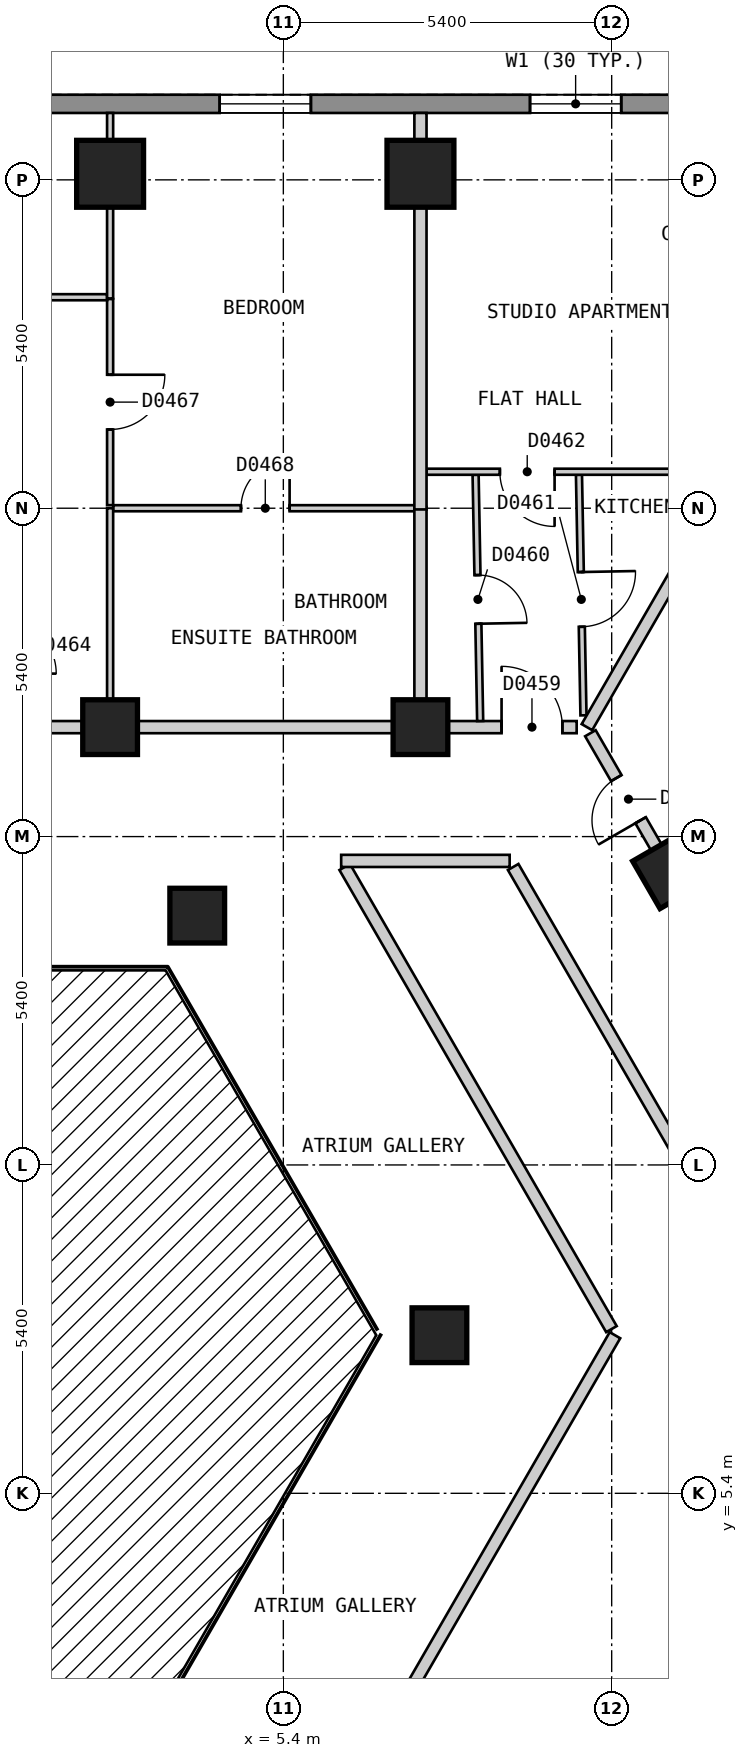
"""IFC4 building model, lengths in metres.
Left out: names, types, materials, properties, quantities, classifications, styles, units other than length and angle.
Written with IfcOpenShell. Run it as: python <this file> out.ifc"""

import sys

from ifc_helpers import new_model, si_unit, direction, frame, frame_2d, origin, origin_2d, place, context, subcontext, project, spatial, polyline, rectangle, outline, extrude, element, fill, save


model = new_model("IFC4")
c1 = context("Model", 3, precision=1e-05, world=origin(), true_north=direction((0.0, 1.0)))
c2 = subcontext(c1, "Body", "Model", "MODEL_VIEW")
j1 = project(units=[si_unit("LENGTHUNIT", "METRE"), si_unit("PLANEANGLEUNIT", "RADIAN")], contexts=[c1])
p1 = place(None, origin())
s1 = spatial("IfcSite", under=j1, at=p1, CompositionType="ELEMENT")
p2 = place(p1, origin())
s2 = spatial("IfcBuilding", under=s1, at=p2, CompositionType="ELEMENT")
p3 = place(p2, frame((0.0, 0.0, 38.4)))
s3 = spatial("IfcBuildingStorey", under=s2, at=p3, CompositionType="ELEMENT", Elevation=38.4)
for number, where, z_axis, x_axis in (
    (1, (7.655, 27.1, 0.0), (0.0, 0.0, 1.0), (-1.0, 0.0, 0.0)),
    (2, (2.551, 27.1, 0.0), (0.0, 0.0, 1.0), (-1.0, 0.0, 0.0)),
):
    element("IfcColumn", number, at=place(p3, frame(where, z_axis=z_axis, x_axis=x_axis)), inside=s3, PredefinedType="COLUMN", context=c2, shape_type="SweptSolid", body=[
        extrude(rectangle(XDim=1.1, YDim=1.1, at=origin_2d()), origin(), (0.0, 0.0, 1.0), 3.0),
    ])
for number, where, z_axis, x_axis in (
    (3, (7.967, 8.0, 0.0), (0.0, 0.0, 1.0), (1.0, 0.0, 0.0)),
    (4, (11.76, 15.631, 0.0), (0.0, 0.0, 1.0), (-0.5, 0.866, 0.0)),
    (5, (7.655, 18.0, 0.0), (0.0, 0.0, 1.0), (-1.0, 0.0, 0.0)),
    (6, (3.984, 14.9, 0.0), (0.0, 0.0, 1.0), (1.0, 0.0, 0.0)),
    (7, (2.551, 18.0, 0.0), (0.0, 0.0, 1.0), (-1.0, 0.0, 0.0)),
):
    element("IfcColumn", number, at=place(p3, frame(where, z_axis=z_axis, x_axis=x_axis)), inside=s3, PredefinedType="COLUMN", context=c2, shape_type="SweptSolid", body=[
        extrude(rectangle(XDim=0.9, YDim=0.9, at=origin_2d()), origin(), (0.0, 0.0, 1.0), 3.0),
    ])
p4 = place(p3, frame((13.51, 28.25, 0.0), z_axis=(0.0, 0.0, 1.0), x_axis=(-1.0, 0.0, 0.0)))
e8 = element("IfcWall", 8, at=p4, inside=s3, PredefinedType="SOLIDWALL", context=c2, shape_type="SweptSolid", body=[
    extrude(outline(polyline([(0.0, -0.15), (27.02, -0.15), (26.94, 0.15), (0.08, 0.15), (0.0, -0.15)])), origin(), (0.0, 0.0, 1.0), 2.7),
])
p5 = place(p4, frame((2.553, 0.0, 0.15)))
e9 = element("IfcOpeningElement", 9, at=p5, cuts=e8, PredefinedType="OPENING", context=c2, shape_type="SweptSolid", body=[
    extrude(rectangle(XDim=1.5, YDim=2.1, at=frame_2d((0.75, 1.05))), frame((0.0, 0.16, 0.0), z_axis=(0.0, -1.0, 0.0), x_axis=(1.0, 0.0, 0.0)), (0.0, 0.0, 1.0), 0.32),
])
p6 = place(p4, frame((7.657, 0.0, 0.15)))
e10 = element("IfcOpeningElement", 10, at=p6, cuts=e8, PredefinedType="OPENING", context=c2, shape_type="SweptSolid", body=[
    extrude(rectangle(XDim=1.5, YDim=2.1, at=frame_2d((0.75, 1.05))), frame((0.0, 0.16, 0.0), z_axis=(0.0, -1.0, 0.0), x_axis=(1.0, 0.0, 0.0)), (0.0, 0.0, 1.0), 0.32),
])
p7 = place(p4, frame((12.761, 0.0, 0.15)))
e11 = element("IfcOpeningElement", 11, at=p7, cuts=e8, PredefinedType="OPENING", context=c2, shape_type="SweptSolid", body=[
    extrude(rectangle(XDim=1.5, YDim=2.1, at=frame_2d((0.75, 1.05))), frame((0.0, 0.16, 0.0), z_axis=(0.0, -1.0, 0.0), x_axis=(1.0, 0.0, 0.0)), (0.0, 0.0, 1.0), 0.32),
])
p8 = place(p4, frame((17.865, 0.0, 0.15)))
e12 = element("IfcOpeningElement", 12, at=p8, cuts=e8, PredefinedType="OPENING", context=c2, shape_type="SweptSolid", body=[
    extrude(rectangle(XDim=1.5, YDim=2.1, at=frame_2d((0.75, 1.05))), frame((0.0, 0.16, 0.0), z_axis=(0.0, -1.0, 0.0), x_axis=(1.0, 0.0, 0.0)), (0.0, 0.0, 1.0), 0.32),
])
p9 = place(p4, frame((22.969, 0.0, 0.15)))
e13 = element("IfcOpeningElement", 13, at=p9, cuts=e8, PredefinedType="OPENING", context=c2, shape_type="SweptSolid", body=[
    extrude(rectangle(XDim=1.5, YDim=2.1, at=frame_2d((0.75, 1.05))), frame((0.0, 0.16, 0.0), z_axis=(0.0, -1.0, 0.0), x_axis=(1.0, 0.0, 0.0)), (0.0, 0.0, 1.0), 0.32),
])
p10 = place(p3, frame((6.409, 15.7, 0.0), z_axis=(0.0, 0.0, 1.0), x_axis=(0.499930377127, -0.866065596838, 0.0)))
e14 = element("IfcWall", 14, at=p10, inside=s3, PredefinedType="PARTITIONING", context=c2, shape_type="SweptSolid", body=[
    extrude(rectangle(XDim=8.775, YDim=0.2, at=frame_2d((4.388, 0.0))), origin(), (0.0, 0.0, 1.0), 2.7),
])
p11 = place(p3, frame((9.18, 15.7, 0.0), z_axis=(0.0, 0.0, 1.0), x_axis=(0.500003652032, -0.866023295272, 0.0)))
e15 = element("IfcWall", 15, at=p11, inside=s3, PredefinedType="PARTITIONING", context=c2, shape_type="SweptSolid", body=[
    extrude(rectangle(XDim=18.012, YDim=0.2, at=frame_2d((9.006, 0.0))), origin(), (0.0, 0.0, 1.0), 2.7),
])
p12 = place(p11, frame((8.556, 0.0, 0.0)))
e16 = element("IfcOpeningElement", 16, at=p12, cuts=e15, PredefinedType="OPENING", context=c2, shape_type="SweptSolid", body=[
    extrude(rectangle(XDim=0.9, YDim=2.1, at=frame_2d((0.45, 1.05))), frame((0.0, 0.11, 0.0), z_axis=(0.0, -1.0, 0.0), x_axis=(1.0, 0.0, 0.0)), (0.0, 0.0, 1.0), 0.22),
])
p13 = place(p3, frame((10.45, 17.9, 0.0), z_axis=(0.0, 0.0, 1.0), x_axis=(0.500034352617, -0.866005569383, 0.0)))
e17 = element("IfcWall", 17, at=p13, inside=s3, PredefinedType="PARTITIONING", context=c2, shape_type="SweptSolid", body=[
    extrude(rectangle(XDim=20.553, YDim=0.2, at=frame_2d((10.276, 0.0))), origin(), (0.0, 0.0, 1.0), 2.7),
])
p14 = place(p13, frame((9.775, 0.0, 0.0)))
e18 = element("IfcOpeningElement", 18, at=p14, cuts=e17, PredefinedType="OPENING", context=c2, shape_type="SweptSolid", body=[
    extrude(rectangle(XDim=1.0, YDim=2.1, at=frame_2d((0.5, 1.05))), frame((0.0, 0.11, 0.0), z_axis=(0.0, -1.0, 0.0), x_axis=(1.0, 0.0, 0.0)), (0.0, 0.0, 1.0), 0.22),
])
p15 = place(p13, frame((0.852, 0.0, 0.0)))
e19 = element("IfcOpeningElement", 19, at=p15, cuts=e17, PredefinedType="OPENING", context=c2, shape_type="SweptSolid", body=[
    extrude(rectangle(XDim=0.8, YDim=2.1, at=frame_2d((0.4, 1.05))), frame((0.0, 0.11, 0.0), z_axis=(0.0, -1.0, 0.0), x_axis=(1.0, 0.0, 0.0)), (0.0, 0.0, 1.0), 0.22),
])
p16 = place(p3, frame((6.351, 15.8, 0.0), z_axis=(0.0, 0.0, 1.0), x_axis=(1.0, 0.0, 0.0)))
e20 = element("IfcWall", 20, at=p16, inside=s3, PredefinedType="PARTITIONING", context=c2, shape_type="SweptSolid", body=[
    extrude(rectangle(XDim=2.771, YDim=0.2, at=frame_2d((1.385, 0.0))), origin(), (0.0, 0.0, 1.0), 2.7),
])
p17 = place(p3, frame((-10.276, 18.0, 0.0), z_axis=(0.0, 0.0, 1.0), x_axis=(1.0, 0.0, 0.0)))
e21 = element("IfcWall", 21, at=p17, inside=s3, PredefinedType="PARTITIONING", context=c2, shape_type="SweptSolid", body=[
    extrude(rectangle(XDim=20.5, YDim=0.2, at=frame_2d((10.25, 0.0))), origin(), (0.0, 0.0, 1.0), 2.7),
])
p18 = place(p17, frame((19.265, 0.0, 0.0)))
e22 = element("IfcOpeningElement", 22, at=p18, cuts=e21, PredefinedType="OPENING", context=c2, shape_type="SweptSolid", body=[
    extrude(rectangle(XDim=1.0, YDim=2.1, at=frame_2d((0.5, 1.05))), frame((0.0, 0.11, 0.0), z_axis=(0.0, -1.0, 0.0), x_axis=(1.0, 0.0, 0.0)), (0.0, 0.0, 1.0), 0.22),
])
p19 = place(p17, frame((9.775, 0.0, 0.0)))
e23 = element("IfcOpeningElement", 23, at=p19, cuts=e21, PredefinedType="OPENING", context=c2, shape_type="SweptSolid", body=[
    extrude(rectangle(XDim=1.0, YDim=2.1, at=frame_2d((0.5, 1.05))), frame((0.0, 0.11, 0.0), z_axis=(0.0, -1.0, 0.0), x_axis=(1.0, 0.0, 0.0)), (0.0, 0.0, 1.0), 0.22),
])
p20 = place(p17, frame((4.671, 0.0, 0.0)))
e24 = element("IfcOpeningElement", 24, at=p20, cuts=e21, PredefinedType="OPENING", context=c2, shape_type="SweptSolid", body=[
    extrude(rectangle(XDim=1.0, YDim=2.1, at=frame_2d((0.5, 1.05))), frame((0.0, 0.11, 0.0), z_axis=(0.0, -1.0, 0.0), x_axis=(1.0, 0.0, 0.0)), (0.0, 0.0, 1.0), 0.22),
])
p21 = place(p3, frame((7.028, 1.373, 0.0), z_axis=(0.0, 0.0, 1.0), x_axis=(0.49998574534, 0.86603363356, 0.0)))
e25 = element("IfcWall", 25, at=p21, inside=s3, PredefinedType="PARTITIONING", context=c2, shape_type="SweptSolid", body=[
    extrude(rectangle(XDim=7.652, YDim=0.2, at=frame_2d((3.826, 0.0))), origin(), (0.0, 0.0, 1.0), 2.7),
])
p22 = place(p3, frame((8.562, 22.15, 0.0), z_axis=(0.0, 0.0, 1.0), x_axis=(0.018504185939, -0.999828782894, 0.0)))
e26 = element("IfcWall", 26, at=p22, inside=s3, PredefinedType="PARTITIONING", context=c2, shape_type="SweptSolid", body=[
    extrude(rectangle(XDim=4.051, YDim=0.1, at=frame_2d((2.025, 0.0))), origin(), (0.0, 0.0, 1.0), 2.7),
])
p23 = place(p22, frame((1.65, 0.0, 0.0)))
e27 = element("IfcOpeningElement", 27, at=p23, cuts=e26, PredefinedType="OPENING", context=c2, shape_type="SweptSolid", body=[
    extrude(rectangle(XDim=0.8, YDim=2.1, at=frame_2d((0.4, 1.05))), frame((0.0, 0.06, 0.0), z_axis=(0.0, -1.0, 0.0), x_axis=(1.0, 0.0, 0.0)), (0.0, 0.0, 1.0), 0.12),
])
p24 = place(p3, frame((10.262, 22.15, 0.0), z_axis=(0.0, 0.0, 1.0), x_axis=(0.018696971826, -0.999825196344, 0.0)))
e28 = element("IfcWall", 28, at=p24, inside=s3, PredefinedType="PARTITIONING", context=c2, shape_type="SweptSolid", body=[
    extrude(rectangle(XDim=3.957, YDim=0.1, at=frame_2d((1.978, 0.0))), origin(), (0.0, 0.0, 1.0), 2.7),
])
p25 = place(p24, frame((1.6, 0.0, 0.0)))
e29 = element("IfcOpeningElement", 29, at=p25, cuts=e28, PredefinedType="OPENING", context=c2, shape_type="SweptSolid", body=[
    extrude(rectangle(XDim=0.9, YDim=2.1, at=frame_2d((0.45, 1.05))), frame((0.0, 0.06, 0.0), z_axis=(0.0, -1.0, 0.0), x_axis=(1.0, 0.0, 0.0)), (0.0, 0.0, 1.0), 0.12),
])
p26 = place(p3, frame((2.551, 25.04, 0.0), z_axis=(0.0, 0.0, 1.0), x_axis=(0.0, -1.0, 0.0)))
e30 = element("IfcWall", 30, at=p26, inside=s3, PredefinedType="PARTITIONING", context=c2, shape_type="SweptSolid", body=[
    extrude(rectangle(XDim=3.39, YDim=0.1, at=frame_2d((1.695, 0.0))), origin(), (0.0, 0.0, 1.0), 2.7),
])
p27 = place(p26, frame((1.245, 0.0, 0.0)))
e31 = element("IfcOpeningElement", 31, at=p27, cuts=e30, PredefinedType="OPENING", context=c2, shape_type="SweptSolid", body=[
    extrude(rectangle(XDim=0.9, YDim=2.1, at=frame_2d((0.45, 1.05))), frame((0.0, 0.06, 0.0), z_axis=(0.0, -1.0, 0.0), x_axis=(1.0, 0.0, 0.0)), (0.0, 0.0, 1.0), 0.12),
])
p28 = place(p3, frame((2.601, 21.6, 0.0), z_axis=(0.0, 0.0, 1.0), x_axis=(1.0, 0.0, 0.0)))
e32 = element("IfcWall", 32, at=p28, inside=s3, PredefinedType="PARTITIONING", context=c2, shape_type="SweptSolid", body=[
    extrude(rectangle(XDim=4.954, YDim=0.1, at=frame_2d((2.477, 0.0))), origin(), (0.0, 0.0, 1.0), 2.7),
])
p29 = place(p28, frame((2.102, 0.0, 0.0)))
e33 = element("IfcOpeningElement", 33, at=p29, cuts=e32, PredefinedType="OPENING", context=c2, shape_type="SweptSolid", body=[
    extrude(rectangle(XDim=0.8, YDim=2.1, at=frame_2d((0.4, 1.05))), frame((0.0, 0.06, 0.0), z_axis=(0.0, -1.0, 0.0), x_axis=(1.0, 0.0, 0.0)), (0.0, 0.0, 1.0), 0.12),
])
p30 = place(p3, frame((7.755, 22.2, 0.0), z_axis=(0.0, 0.0, 1.0), x_axis=(1.0, 0.0, 0.0)))
e34 = element("IfcWall", 34, at=p30, inside=s3, PredefinedType="PARTITIONING", context=c2, shape_type="SweptSolid", body=[
    extrude(rectangle(XDim=4.947, YDim=0.1, at=frame_2d((2.474, 0.0))), origin(), (0.0, 0.0, 1.0), 2.7),
])
p31 = place(p30, frame((1.206, 0.0, 0.0)))
e35 = element("IfcOpeningElement", 35, at=p31, cuts=e34, PredefinedType="OPENING", context=c2, shape_type="SweptSolid", body=[
    extrude(rectangle(XDim=0.9, YDim=2.1, at=frame_2d((0.45, 1.05))), frame((0.0, 0.06, 0.0), z_axis=(0.0, -1.0, 0.0), x_axis=(1.0, 0.0, 0.0)), (0.0, 0.0, 1.0), 0.12),
])
p32 = place(p3, frame((-2.453, 25.07, 0.0), z_axis=(0.0, 0.0, 1.0), x_axis=(1.0, 0.0, 0.0)))
e36 = element("IfcWall", 36, at=p32, inside=s3, PredefinedType="PARTITIONING", context=c2, shape_type="SweptSolid", body=[
    extrude(rectangle(XDim=4.954, YDim=0.1, at=frame_2d((2.477, 0.0))), origin(), (0.0, 0.0, 1.0), 2.7),
])
p33 = place(p32, frame((2.002, 0.0, 0.0)))
e37 = element("IfcOpeningElement", 37, at=p33, cuts=e36, PredefinedType="OPENING", context=c2, shape_type="SweptSolid", body=[
    extrude(rectangle(XDim=0.9, YDim=2.1, at=frame_2d((0.45, 1.05))), frame((0.0, 0.06, 0.0), z_axis=(0.0, -1.0, 0.0), x_axis=(1.0, 0.0, 0.0)), (0.0, 0.0, 1.0), 0.12),
])
p34 = place(p3, frame((2.551, 18.1, 0.0), z_axis=(0.0, 0.0, 1.0), x_axis=(0.0, 1.0, 0.0)))
e38 = element("IfcWall", 38, at=p34, inside=s3, PredefinedType="PARTITIONING", context=c2, shape_type="SweptSolid", body=[
    extrude(rectangle(XDim=3.5, YDim=0.1, at=frame_2d((1.75, 0.0))), origin(), (0.0, 0.0, 1.0), 2.7),
])
p35 = place(p3, frame((2.551, 25.05, 0.0), z_axis=(0.0, 0.0, 1.0), x_axis=(0.0, 1.0, 0.0)))
e39 = element("IfcWall", 39, at=p35, inside=s3, PredefinedType="PARTITIONING", context=c2, shape_type="SweptSolid", body=[
    extrude(rectangle(XDim=3.05, YDim=0.1, at=frame_2d((1.525, 0.0))), origin(), (0.0, 0.0, 1.0), 2.7),
])
p36 = place(p3, frame((7.655, 21.62, 0.0), z_axis=(0.0, 0.0, 1.0), x_axis=(0.0, -1.0, 0.0)))
e40 = element("IfcWall", 40, at=p36, inside=s3, PredefinedType="PARTITIONING", context=c2, shape_type="SweptSolid", body=[
    extrude(rectangle(XDim=3.52, YDim=0.2, at=frame_2d((1.76, 0.0))), origin(), (0.0, 0.0, 1.0), 2.7),
])
p37 = place(p3, frame((10.393, 18.0, 0.0), z_axis=(0.0, 0.0, 1.0), x_axis=(0.499945497007, 0.866056868816, 0.0)))
e41 = element("IfcWall", 41, at=p37, inside=s3, PredefinedType="PARTITIONING", context=c2, shape_type="SweptSolid", body=[
    extrude(rectangle(XDim=10.265, YDim=0.2, at=frame_2d((5.132, 0.0))), origin(), (0.0, 0.0, 1.0), 2.7),
])
p38 = place(p3, frame((7.655, 21.58, 0.0), z_axis=(0.0, 0.0, 1.0), x_axis=(0.0, 1.0, 0.0)))
e42 = element("IfcWall", 42, at=p38, inside=s3, PredefinedType="PARTITIONING", context=c2, shape_type="SweptSolid", body=[
    extrude(rectangle(XDim=6.52, YDim=0.2, at=frame_2d((3.26, 0.0))), origin(), (0.0, 0.0, 1.0), 2.7),
])
p39 = place(p5, origin())
e43 = element("IfcWindow", 43, at=p39, inside=s3, PartitioningType="SINGLE_PANEL", PredefinedType="WINDOW", context=c2, shape_type="SweptSolid", body=[
    extrude(rectangle(XDim=1.5, YDim=2.1, at=frame_2d((0.75, 1.05))), frame((0.0, 0.03, 0.0), z_axis=(0.0, -1.0, 0.0), x_axis=(1.0, 0.0, 0.0)), (0.0, 0.0, 1.0), 0.06),
])
fill(e9, e43)
p40 = place(p6, origin())
e44 = element("IfcWindow", 44, at=p40, inside=s3, PartitioningType="SINGLE_PANEL", PredefinedType="WINDOW", context=c2, shape_type="SweptSolid", body=[
    extrude(rectangle(XDim=1.5, YDim=2.1, at=frame_2d((0.75, 1.05))), frame((0.0, 0.03, 0.0), z_axis=(0.0, -1.0, 0.0), x_axis=(1.0, 0.0, 0.0)), (0.0, 0.0, 1.0), 0.06),
])
fill(e10, e44)
p41 = place(p15, origin())
e45 = element("IfcDoor", 45, at=p41, inside=s3, OperationType="SINGLE_SWING_RIGHT", PredefinedType="DOOR", context=c2, shape_type="SweptSolid", body=[
    extrude(rectangle(XDim=0.8, YDim=2.1, at=frame_2d((0.4, 1.05))), frame((0.0, 0.025, 0.0), z_axis=(0.0, -1.0, 0.0), x_axis=(1.0, 0.0, 0.0)), (0.0, 0.0, 1.0), 0.05),
])
fill(e19, e45)
p42 = place(p18, origin())
e46 = element("IfcDoor", 46, at=p42, inside=s3, OperationType="SINGLE_SWING_LEFT", PredefinedType="DOOR", context=c2, shape_type="SweptSolid", body=[
    extrude(rectangle(XDim=1.0, YDim=2.1, at=frame_2d((0.5, 1.05))), frame((0.0, 0.025, 0.0), z_axis=(0.0, -1.0, 0.0), x_axis=(1.0, 0.0, 0.0)), (0.0, 0.0, 1.0), 0.05),
])
fill(e22, e46)
p43 = place(p23, origin())
e47 = element("IfcDoor", 47, at=p43, inside=s3, OperationType="SINGLE_SWING_RIGHT", PredefinedType="DOOR", context=c2, shape_type="SweptSolid", body=[
    extrude(rectangle(XDim=0.8, YDim=2.1, at=frame_2d((0.4, 1.05))), frame((0.0, 0.025, 0.0), z_axis=(0.0, -1.0, 0.0), x_axis=(1.0, 0.0, 0.0)), (0.0, 0.0, 1.0), 0.05),
])
fill(e27, e47)
p44 = place(p25, origin())
e48 = element("IfcDoor", 48, at=p44, inside=s3, OperationType="SINGLE_SWING_LEFT", PredefinedType="DOOR", context=c2, shape_type="SweptSolid", body=[
    extrude(rectangle(XDim=0.9, YDim=2.1, at=frame_2d((0.45, 1.05))), frame((0.0, 0.025, 0.0), z_axis=(0.0, -1.0, 0.0), x_axis=(1.0, 0.0, 0.0)), (0.0, 0.0, 1.0), 0.05),
])
fill(e29, e48)
p45 = place(p31, origin())
e49 = element("IfcDoor", 49, at=p45, inside=s3, OperationType="SINGLE_SWING_RIGHT", PredefinedType="DOOR", context=c2, shape_type="SweptSolid", body=[
    extrude(rectangle(XDim=0.9, YDim=2.1, at=frame_2d((0.45, 1.05))), frame((0.0, 0.025, 0.0), z_axis=(0.0, -1.0, 0.0), x_axis=(1.0, 0.0, 0.0)), (0.0, 0.0, 1.0), 0.05),
])
fill(e35, e49)
p46 = place(p27, origin())
e50 = element("IfcDoor", 50, at=p46, inside=s3, OperationType="SINGLE_SWING_LEFT", PredefinedType="DOOR", context=c2, shape_type="SweptSolid", body=[
    extrude(rectangle(XDim=0.9, YDim=2.1, at=frame_2d((0.45, 1.05))), frame((0.0, 0.025, 0.0), z_axis=(0.0, -1.0, 0.0), x_axis=(1.0, 0.0, 0.0)), (0.0, 0.0, 1.0), 0.05),
])
fill(e31, e50)
p47 = place(p29, origin())
e51 = element("IfcDoor", 51, at=p47, inside=s3, OperationType="SINGLE_SWING_RIGHT", PredefinedType="DOOR", context=c2, shape_type="SweptSolid", body=[
    extrude(rectangle(XDim=0.8, YDim=2.1, at=frame_2d((0.4, 1.05))), frame((0.0, 0.025, 0.0), z_axis=(0.0, -1.0, 0.0), x_axis=(1.0, 0.0, 0.0)), (0.0, 0.0, 1.0), 0.05),
])
fill(e33, e51)
save(model, sys.argv[1])
